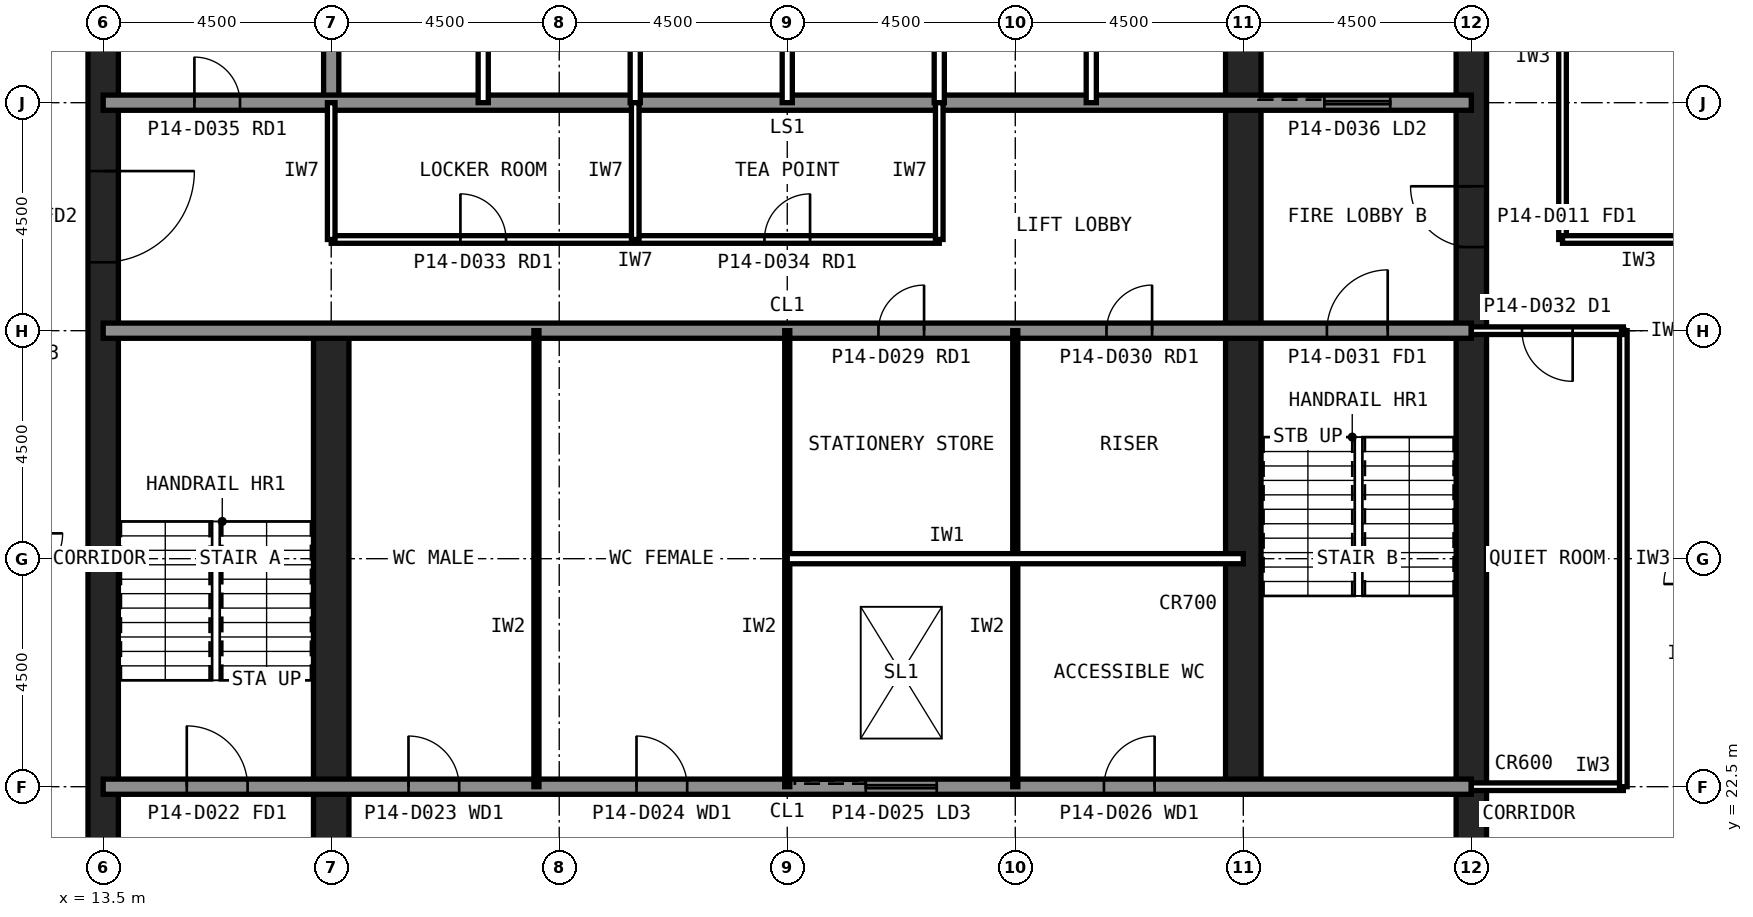
"""IFC4 building model, lengths in metres.
Left out: names, types, materials, properties, quantities, classifications, styles, units other than length and angle.
Written with IfcOpenShell. Run it as: python <this file> out.ifc"""

import sys

from ifc_helpers import new_model, si_unit, direction, frame, frame_2d, origin, place, context, subcontext, project, spatial, rectangle, extrude, element, fill, save


model = new_model("IFC4")
c1 = context("Model", 3, precision=1e-05, world=origin(), true_north=direction((0.0, 1.0)))
c2 = subcontext(c1, "Body", "Model", "MODEL_VIEW")
j1 = project(units=[si_unit("LENGTHUNIT", "METRE"), si_unit("PLANEANGLEUNIT", "RADIAN")], contexts=[c1])
p1 = place(None, origin())
s1 = spatial("IfcSite", under=j1, at=p1, CompositionType="ELEMENT")
p2 = place(p1, origin())
s2 = spatial("IfcBuilding", under=s1, at=p2, CompositionType="ELEMENT")
p3 = place(p2, frame((0.0, 0.0, 62.6)))
s3 = spatial("IfcBuildingStorey", under=s2, at=p3, CompositionType="ELEMENT", Elevation=62.6)
p4 = place(p3, frame((40.5, 13.5, 0.0), z_axis=(0.0, 0.0, 1.0), x_axis=(0.0, 1.0, 0.0)))
e1 = element("IfcWall", 1, at=p4, inside=s3, PredefinedType="SHEAR", context=c2, shape_type="SweptSolid", body=[
    extrude(rectangle(XDim=27.0, YDim=0.6, at=frame_2d((13.5, 0.0))), origin(), (0.0, 0.0, 1.0), 4.2),
])
p5 = place(p4, frame((5.85, 0.0, 0.0)))
e2 = element("IfcOpeningElement", 2, at=p5, cuts=e1, PredefinedType="OPENING", context=c2, shape_type="SweptSolid", body=[
    extrude(rectangle(XDim=1.8, YDim=2.1, at=frame_2d((0.9, 1.05))), frame((0.0, 0.31, 0.0), z_axis=(0.0, -1.0, 0.0), x_axis=(1.0, 0.0, 0.0)), (0.0, 0.0, 1.0), 0.62),
])
p6 = place(p4, frame((19.65, 0.0, 0.0)))
e3 = element("IfcOpeningElement", 3, at=p6, cuts=e1, PredefinedType="OPENING", context=c2, shape_type="SweptSolid", body=[
    extrude(rectangle(XDim=1.2, YDim=2.1, at=frame_2d((0.6, 1.05))), frame((0.0, 0.31, 0.0), z_axis=(0.0, -1.0, 0.0), x_axis=(1.0, 0.0, 0.0)), (0.0, 0.0, 1.0), 0.62),
])
p7 = place(p3, frame((13.5, 40.5, 0.0), z_axis=(0.0, 0.0, 1.0), x_axis=(0.0, -1.0, 0.0)))
e4 = element("IfcWall", 4, at=p7, inside=s3, PredefinedType="SHEAR", context=c2, shape_type="SweptSolid", body=[
    extrude(rectangle(XDim=27.0, YDim=0.6, at=frame_2d((13.5, 0.0))), origin(), (0.0, 0.0, 1.0), 4.2),
])
p8 = place(p7, frame((19.65, 0.0, 0.0)))
e5 = element("IfcOpeningElement", 5, at=p8, cuts=e4, PredefinedType="OPENING", context=c2, shape_type="SweptSolid", body=[
    extrude(rectangle(XDim=1.2, YDim=2.1, at=frame_2d((0.6, 1.05))), frame((0.0, 0.31, 0.0), z_axis=(0.0, -1.0, 0.0), x_axis=(1.0, 0.0, 0.0)), (0.0, 0.0, 1.0), 0.62),
])
p9 = place(p7, frame((5.85, 0.0, 0.0)))
e6 = element("IfcOpeningElement", 6, at=p9, cuts=e4, PredefinedType="OPENING", context=c2, shape_type="SweptSolid", body=[
    extrude(rectangle(XDim=1.8, YDim=2.1, at=frame_2d((0.9, 1.05))), frame((0.0, 0.31, 0.0), z_axis=(0.0, -1.0, 0.0), x_axis=(1.0, 0.0, 0.0)), (0.0, 0.0, 1.0), 0.62),
])
p10 = place(p3, frame((18.0, 13.5, 0.0), z_axis=(0.0, 0.0, 1.0), x_axis=(0.0, 1.0, 0.0)))
e7 = element("IfcWall", 7, at=p10, inside=s3, PredefinedType="SHEAR", context=c2, shape_type="SweptSolid", body=[
    extrude(rectangle(XDim=18.0, YDim=0.7, at=frame_2d((9.0, 0.0))), origin(), (0.0, 0.0, 1.0), 4.2),
])
p11 = place(p3, frame((18.0, 36.0, 0.0), z_axis=(0.0, 0.0, 1.0), x_axis=(0.0, 1.0, 0.0)))
e8 = element("IfcWall", 8, at=p11, inside=s3, PredefinedType="SOLIDWALL", context=c2, shape_type="SweptSolid", body=[
    extrude(rectangle(XDim=4.5, YDim=0.3, at=frame_2d((2.25, 0.0))), origin(), (0.0, 0.0, 1.0), 4.04),
])
p12 = place(p3, frame((36.0, 22.5, 0.0), z_axis=(0.0, 0.0, 1.0), x_axis=(0.0, 1.0, 0.0)))
e9 = element("IfcWall", 9, at=p12, inside=s3, PredefinedType="SHEAR", context=c2, shape_type="SweptSolid", body=[
    extrude(rectangle(XDim=18.0, YDim=0.7, at=frame_2d((9.0, 0.0))), origin(), (0.0, 0.0, 1.0), 4.2),
])
p13 = place(p3, frame((13.5, 36.0, 0.0), z_axis=(0.0, 0.0, 1.0), x_axis=(1.0, 0.0, 0.0)))
e10 = element("IfcWall", 10, at=p13, inside=s3, PredefinedType="SOLIDWALL", context=c2, shape_type="SweptSolid", body=[
    extrude(rectangle(XDim=27.0, YDim=0.3, at=frame_2d((13.5, 0.0))), origin(), (0.0, 0.0, 1.0), 4.04),
])
p14 = place(p13, frame((1.8, 0.0, 0.0)))
e11 = element("IfcOpeningElement", 11, at=p14, cuts=e10, PredefinedType="OPENING", context=c2, shape_type="SweptSolid", body=[
    extrude(rectangle(XDim=0.9, YDim=2.1, at=frame_2d((0.45, 1.05))), frame((0.0, 0.16, 0.0), z_axis=(0.0, -1.0, 0.0), x_axis=(1.0, 0.0, 0.0)), (0.0, 0.0, 1.0), 0.32),
])
p15 = place(p13, frame((24.1, 0.0, 0.0)))
e12 = element("IfcOpeningElement", 12, at=p15, cuts=e10, PredefinedType="OPENING", context=c2, shape_type="SweptSolid", body=[
    extrude(rectangle(XDim=1.3, YDim=2.2, at=frame_2d((0.65, 1.1))), frame((0.0, 0.16, 0.0), z_axis=(0.0, -1.0, 0.0), x_axis=(1.0, 0.0, 0.0)), (0.0, 0.0, 1.0), 0.32),
])
p16 = place(p3, frame((13.5, 22.5, 0.0), z_axis=(0.0, 0.0, 1.0), x_axis=(1.0, 0.0, 0.0)))
e13 = element("IfcWall", 13, at=p16, inside=s3, PredefinedType="SOLIDWALL", context=c2, shape_type="SweptSolid", body=[
    extrude(rectangle(XDim=27.0, YDim=0.3, at=frame_2d((13.5, 0.0))), origin(), (0.0, 0.0, 1.0), 4.04),
])
p17 = place(p16, frame((1.65, 0.0, 0.0)))
e14 = element("IfcOpeningElement", 14, at=p17, cuts=e13, PredefinedType="OPENING", context=c2, shape_type="SweptSolid", body=[
    extrude(rectangle(XDim=1.2, YDim=2.1, at=frame_2d((0.6, 1.05))), frame((0.0, 0.16, 0.0), z_axis=(0.0, -1.0, 0.0), x_axis=(1.0, 0.0, 0.0)), (0.0, 0.0, 1.0), 0.32),
])
p18 = place(p16, frame((6.025, 0.0, 0.0)))
e15 = element("IfcOpeningElement", 15, at=p18, cuts=e13, PredefinedType="OPENING", context=c2, shape_type="SweptSolid", body=[
    extrude(rectangle(XDim=1.0, YDim=2.1, at=frame_2d((0.5, 1.05))), frame((0.0, 0.16, 0.0), z_axis=(0.0, -1.0, 0.0), x_axis=(1.0, 0.0, 0.0)), (0.0, 0.0, 1.0), 0.32),
])
p19 = place(p16, frame((10.525, 0.0, 0.0)))
e16 = element("IfcOpeningElement", 16, at=p19, cuts=e13, PredefinedType="OPENING", context=c2, shape_type="SweptSolid", body=[
    extrude(rectangle(XDim=1.0, YDim=2.1, at=frame_2d((0.5, 1.05))), frame((0.0, 0.16, 0.0), z_axis=(0.0, -1.0, 0.0), x_axis=(1.0, 0.0, 0.0)), (0.0, 0.0, 1.0), 0.32),
])
p20 = place(p16, frame((19.75, 0.0, 0.0)))
e17 = element("IfcOpeningElement", 17, at=p20, cuts=e13, PredefinedType="OPENING", context=c2, shape_type="SweptSolid", body=[
    extrude(rectangle(XDim=1.0, YDim=2.1, at=frame_2d((0.5, 1.05))), frame((0.0, 0.16, 0.0), z_axis=(0.0, -1.0, 0.0), x_axis=(1.0, 0.0, 0.0)), (0.0, 0.0, 1.0), 0.32),
])
p21 = place(p16, frame((15.05, 0.0, 0.0)))
e18 = element("IfcOpeningElement", 18, at=p21, cuts=e13, PredefinedType="OPENING", context=c2, shape_type="SweptSolid", body=[
    extrude(rectangle(XDim=1.4, YDim=2.4, at=frame_2d((0.7, 1.2))), frame((0.0, 0.16, 0.0), z_axis=(0.0, -1.0, 0.0), x_axis=(1.0, 0.0, 0.0)), (0.0, 0.0, 1.0), 0.32),
])
p22 = place(p3, frame((13.5, 31.5, 0.0), z_axis=(0.0, 0.0, 1.0), x_axis=(1.0, 0.0, 0.0)))
e19 = element("IfcWall", 19, at=p22, inside=s3, PredefinedType="SOLIDWALL", context=c2, shape_type="SweptSolid", body=[
    extrude(rectangle(XDim=27.0, YDim=0.3, at=frame_2d((13.5, 0.0))), origin(), (0.0, 0.0, 1.0), 4.04),
])
p23 = place(p22, frame((24.15, 0.0, 0.0)))
e20 = element("IfcOpeningElement", 20, at=p23, cuts=e19, PredefinedType="OPENING", context=c2, shape_type="SweptSolid", body=[
    extrude(rectangle(XDim=1.2, YDim=2.1, at=frame_2d((0.6, 1.05))), frame((0.0, 0.16, 0.0), z_axis=(0.0, -1.0, 0.0), x_axis=(1.0, 0.0, 0.0)), (0.0, 0.0, 1.0), 0.32),
])
p24 = place(p22, frame((15.3, 0.0, 0.0)))
e21 = element("IfcOpeningElement", 21, at=p24, cuts=e19, PredefinedType="OPENING", context=c2, shape_type="SweptSolid", body=[
    extrude(rectangle(XDim=0.9, YDim=2.1, at=frame_2d((0.45, 1.05))), frame((0.0, 0.16, 0.0), z_axis=(0.0, -1.0, 0.0), x_axis=(1.0, 0.0, 0.0)), (0.0, 0.0, 1.0), 0.32),
])
p25 = place(p22, frame((19.8, 0.0, 0.0)))
e22 = element("IfcOpeningElement", 22, at=p25, cuts=e19, PredefinedType="OPENING", context=c2, shape_type="SweptSolid", body=[
    extrude(rectangle(XDim=0.9, YDim=2.1, at=frame_2d((0.45, 1.05))), frame((0.0, 0.16, 0.0), z_axis=(0.0, -1.0, 0.0), x_axis=(1.0, 0.0, 0.0)), (0.0, 0.0, 1.0), 0.32),
])
for number, where, z_axis, x_axis in (
    (23, (21.0, 36.0, 0.0), (0.0, 0.0, 1.0), (0.0, 1.0, 0.0)),
    (24, (24.0, 36.0, 0.0), (0.0, 0.0, 1.0), (0.0, 1.0, 0.0)),
    (25, (27.0, 36.0, 0.0), (0.0, 0.0, 1.0), (0.0, 1.0, 0.0)),
    (26, (30.0, 36.0, 0.0), (0.0, 0.0, 1.0), (0.0, 1.0, 0.0)),
    (27, (33.0, 36.0, 0.0), (0.0, 0.0, 1.0), (0.0, 1.0, 0.0)),
):
    element("IfcWall", number, at=place(p3, frame(where, z_axis=z_axis, x_axis=x_axis)), inside=s3, PredefinedType="PARTITIONING", context=c2, shape_type="SweptSolid", body=[
        extrude(rectangle(XDim=4.5, YDim=0.2, at=frame_2d((2.25, 0.0))), origin(), (0.0, 0.0, 1.0), 4.04),
    ])
for number, where, z_axis, x_axis in (
    (28, (22.05, 22.5, 0.0), (0.0, 0.0, 1.0), (0.0, 1.0, 0.0)),
    (29, (27.0, 22.5, 0.0), (0.0, 0.0, 1.0), (0.0, 1.0, 0.0)),
    (30, (31.5, 22.5, 0.0), (0.0, 0.0, 1.0), (0.0, 1.0, 0.0)),
):
    element("IfcWall", number, at=place(p3, frame(where, z_axis=z_axis, x_axis=x_axis)), inside=s3, PredefinedType="PLUMBINGWALL", context=c2, shape_type="SweptSolid", body=[
        extrude(rectangle(XDim=9.0, YDim=0.1, at=frame_2d((4.5, 0.0))), origin(), (0.0, 0.0, 1.0), 4.04),
    ])
p26 = place(p3, frame((27.0, 27.0, 0.0), z_axis=(0.0, 0.0, 1.0), x_axis=(1.0, 0.0, 0.0)))
e31 = element("IfcWall", 31, at=p26, inside=s3, PredefinedType="PARTITIONING", context=c2, shape_type="SweptSolid", body=[
    extrude(rectangle(XDim=9.0, YDim=0.2, at=frame_2d((4.5, 0.0))), origin(), (0.0, 0.0, 1.0), 4.04),
])
p27 = place(p3, frame((18.0, 33.3, 0.0), z_axis=(0.0, 0.0, 1.0), x_axis=(1.0, 0.0, 0.0)))
e32 = element("IfcWall", 32, at=p27, inside=s3, PredefinedType="PARTITIONING", context=c2, shape_type="SweptSolid", body=[
    extrude(rectangle(XDim=12.0, YDim=0.15, at=frame_2d((6.0, 0.0))), origin(), (0.0, 0.0, 1.0), 4.04),
])
p28 = place(p27, frame((2.55, 0.0, 0.0)))
e33 = element("IfcOpeningElement", 33, at=p28, cuts=e32, PredefinedType="OPENING", context=c2, shape_type="SweptSolid", body=[
    extrude(rectangle(XDim=0.9, YDim=2.1, at=frame_2d((0.45, 1.05))), frame((0.0, 0.085, 0.0), z_axis=(0.0, -1.0, 0.0), x_axis=(1.0, 0.0, 0.0)), (0.0, 0.0, 1.0), 0.17),
])
p29 = place(p27, frame((8.55, 0.0, 0.0)))
e34 = element("IfcOpeningElement", 34, at=p29, cuts=e32, PredefinedType="OPENING", context=c2, shape_type="SweptSolid", body=[
    extrude(rectangle(XDim=0.9, YDim=2.1, at=frame_2d((0.45, 1.05))), frame((0.0, 0.085, 0.0), z_axis=(0.0, -1.0, 0.0), x_axis=(1.0, 0.0, 0.0)), (0.0, 0.0, 1.0), 0.17),
])
for number, where, z_axis, x_axis in (
    (35, (18.0, 33.3, 0.0), (0.0, 0.0, 1.0), (0.0, 1.0, 0.0)),
    (36, (24.0, 33.3, 0.0), (0.0, 0.0, 1.0), (0.0, 1.0, 0.0)),
    (37, (30.0, 33.3, 0.0), (0.0, 0.0, 1.0), (0.0, 1.0, 0.0)),
):
    element("IfcWall", number, at=place(p3, frame(where, z_axis=z_axis, x_axis=x_axis)), inside=s3, PredefinedType="PARTITIONING", context=c2, shape_type="SweptSolid", body=[
        extrude(rectangle(XDim=2.7, YDim=0.15, at=frame_2d((1.35, 0.0))), origin(), (0.0, 0.0, 1.0), 4.04),
    ])
p30 = place(p3, frame((42.3, 33.3, 0.0), z_axis=(0.0, 0.0, 1.0), x_axis=(0.0, 1.0, 0.0)))
e38 = element("IfcWall", 38, at=p30, inside=s3, PredefinedType="PARTITIONING", context=c2, shape_type="SweptSolid", body=[
    extrude(rectangle(XDim=7.2, YDim=0.15, at=frame_2d((3.6, 0.0))), origin(), (0.0, 0.0, 1.0), 4.04),
])
p31 = place(p3, frame((45.3, 33.3, 0.0), z_axis=(0.0, 0.0, 1.0), x_axis=(-1.0, 0.0, 0.0)))
e39 = element("IfcWall", 39, at=p31, inside=s3, PredefinedType="PARTITIONING", context=c2, shape_type="SweptSolid", body=[
    extrude(rectangle(XDim=3.0, YDim=0.15, at=frame_2d((1.5, 0.0))), origin(), (0.0, 0.0, 1.0), 4.04),
])
p32 = place(p3, frame((40.5, 22.5, 0.0), z_axis=(0.0, 0.0, 1.0), x_axis=(1.0, 0.0, 0.0)))
e40 = element("IfcWall", 40, at=p32, inside=s3, PredefinedType="PARTITIONING", context=c2, shape_type="SweptSolid", body=[
    extrude(rectangle(XDim=3.0, YDim=0.15, at=frame_2d((1.5, 0.0))), origin(), (0.0, 0.0, 1.0), 3.189),
])
p33 = place(p3, frame((43.5, 22.5, 0.0), z_axis=(0.0, 0.0, 1.0), x_axis=(0.0, 1.0, 0.0)))
e41 = element("IfcWall", 41, at=p33, inside=s3, PredefinedType="PARTITIONING", context=c2, shape_type="SweptSolid", body=[
    extrude(rectangle(XDim=9.0, YDim=0.15, at=frame_2d((4.5, 0.0))), origin(), (0.0, 0.0, 1.0), 4.04),
])
p34 = place(p3, frame((43.5, 31.5, 0.0), z_axis=(0.0, 0.0, 1.0), x_axis=(-1.0, 0.0, 0.0)))
e42 = element("IfcWall", 42, at=p34, inside=s3, PredefinedType="PARTITIONING", context=c2, shape_type="SweptSolid", body=[
    extrude(rectangle(XDim=3.0, YDim=0.15, at=frame_2d((1.5, 0.0))), origin(), (0.0, 0.0, 1.0), 3.189),
])
p35 = place(p34, frame((1.0, 0.0, 0.0)))
e43 = element("IfcOpeningElement", 43, at=p35, cuts=e42, PredefinedType="OPENING", context=c2, shape_type="SweptSolid", body=[
    extrude(rectangle(XDim=1.0, YDim=2.1, at=frame_2d((0.5, 1.05))), frame((0.0, 0.085, 0.0), z_axis=(0.0, -1.0, 0.0), x_axis=(1.0, 0.0, 0.0)), (0.0, 0.0, 1.0), 0.17),
])
p36 = place(p9, origin())
e44 = element("IfcDoor", 44, at=p36, inside=s3, OperationType="SINGLE_SWING_LEFT", PredefinedType="DOOR", context=c2, shape_type="SweptSolid", body=[
    extrude(rectangle(XDim=1.8, YDim=2.1, at=frame_2d((0.9, 1.05))), frame((0.0, 0.025, 0.0), z_axis=(0.0, -1.0, 0.0), x_axis=(1.0, 0.0, 0.0)), (0.0, 0.0, 1.0), 0.05),
])
fill(e6, e44)
p37 = place(p6, origin())
e45 = element("IfcDoor", 45, at=p37, inside=s3, OperationType="SINGLE_SWING_RIGHT", PredefinedType="DOOR", context=c2, shape_type="SweptSolid", body=[
    extrude(rectangle(XDim=1.2, YDim=2.1, at=frame_2d((0.6, 1.05))), frame((0.0, 0.025, 0.0), z_axis=(0.0, -1.0, 0.0), x_axis=(1.0, 0.0, 0.0)), (0.0, 0.0, 1.0), 0.05),
])
fill(e3, e45)
p38 = place(p17, origin())
e46 = element("IfcDoor", 46, at=p38, inside=s3, OperationType="SINGLE_SWING_LEFT", PredefinedType="DOOR", context=c2, shape_type="SweptSolid", body=[
    extrude(rectangle(XDim=1.2, YDim=2.1, at=frame_2d((0.6, 1.05))), frame((0.0, 0.025, 0.0), z_axis=(0.0, -1.0, 0.0), x_axis=(1.0, 0.0, 0.0)), (0.0, 0.0, 1.0), 0.05),
])
fill(e14, e46)
p39 = place(p23, origin())
e47 = element("IfcDoor", 47, at=p39, inside=s3, OperationType="SINGLE_SWING_RIGHT", PredefinedType="DOOR", context=c2, shape_type="SweptSolid", body=[
    extrude(rectangle(XDim=1.2, YDim=2.1, at=frame_2d((0.6, 1.05))), frame((0.0, 0.025, 0.0), z_axis=(0.0, -1.0, 0.0), x_axis=(1.0, 0.0, 0.0)), (0.0, 0.0, 1.0), 0.05),
])
fill(e20, e47)
p40 = place(p18, origin())
e48 = element("IfcDoor", 48, at=p40, inside=s3, OperationType="SINGLE_SWING_LEFT", PredefinedType="DOOR", context=c2, shape_type="SweptSolid", body=[
    extrude(rectangle(XDim=1.0, YDim=2.1, at=frame_2d((0.5, 1.05))), frame((0.0, 0.025, 0.0), z_axis=(0.0, -1.0, 0.0), x_axis=(1.0, 0.0, 0.0)), (0.0, 0.0, 1.0), 0.05),
])
fill(e15, e48)
p41 = place(p19, origin())
e49 = element("IfcDoor", 49, at=p41, inside=s3, OperationType="SINGLE_SWING_LEFT", PredefinedType="DOOR", context=c2, shape_type="SweptSolid", body=[
    extrude(rectangle(XDim=1.0, YDim=2.1, at=frame_2d((0.5, 1.05))), frame((0.0, 0.025, 0.0), z_axis=(0.0, -1.0, 0.0), x_axis=(1.0, 0.0, 0.0)), (0.0, 0.0, 1.0), 0.05),
])
fill(e16, e49)
p42 = place(p20, origin())
e50 = element("IfcDoor", 50, at=p42, inside=s3, OperationType="SINGLE_SWING_RIGHT", PredefinedType="DOOR", context=c2, shape_type="SweptSolid", body=[
    extrude(rectangle(XDim=1.0, YDim=2.1, at=frame_2d((0.5, 1.05))), frame((0.0, 0.025, 0.0), z_axis=(0.0, -1.0, 0.0), x_axis=(1.0, 0.0, 0.0)), (0.0, 0.0, 1.0), 0.05),
])
fill(e17, e50)
p43 = place(p24, origin())
e51 = element("IfcDoor", 51, at=p43, inside=s3, OperationType="SINGLE_SWING_RIGHT", PredefinedType="DOOR", context=c2, shape_type="SweptSolid", body=[
    extrude(rectangle(XDim=0.9, YDim=2.1, at=frame_2d((0.45, 1.05))), frame((0.0, 0.025, 0.0), z_axis=(0.0, -1.0, 0.0), x_axis=(1.0, 0.0, 0.0)), (0.0, 0.0, 1.0), 0.05),
])
fill(e21, e51)
p44 = place(p25, origin())
e52 = element("IfcDoor", 52, at=p44, inside=s3, OperationType="SINGLE_SWING_RIGHT", PredefinedType="DOOR", context=c2, shape_type="SweptSolid", body=[
    extrude(rectangle(XDim=0.9, YDim=2.1, at=frame_2d((0.45, 1.05))), frame((0.0, 0.025, 0.0), z_axis=(0.0, -1.0, 0.0), x_axis=(1.0, 0.0, 0.0)), (0.0, 0.0, 1.0), 0.05),
])
fill(e22, e52)
p45 = place(p14, origin())
e53 = element("IfcDoor", 53, at=p45, inside=s3, OperationType="SINGLE_SWING_LEFT", PredefinedType="DOOR", context=c2, shape_type="SweptSolid", body=[
    extrude(rectangle(XDim=0.9, YDim=2.1, at=frame_2d((0.45, 1.05))), frame((0.0, 0.025, 0.0), z_axis=(0.0, -1.0, 0.0), x_axis=(1.0, 0.0, 0.0)), (0.0, 0.0, 1.0), 0.05),
])
fill(e11, e53)
p46 = place(p28, origin())
e54 = element("IfcDoor", 54, at=p46, inside=s3, OperationType="SINGLE_SWING_LEFT", PredefinedType="DOOR", context=c2, shape_type="SweptSolid", body=[
    extrude(rectangle(XDim=0.9, YDim=2.1, at=frame_2d((0.45, 1.05))), frame((0.0, 0.025, 0.0), z_axis=(0.0, -1.0, 0.0), x_axis=(1.0, 0.0, 0.0)), (0.0, 0.0, 1.0), 0.05),
])
fill(e33, e54)
p47 = place(p29, origin())
e55 = element("IfcDoor", 55, at=p47, inside=s3, OperationType="SINGLE_SWING_RIGHT", PredefinedType="DOOR", context=c2, shape_type="SweptSolid", body=[
    extrude(rectangle(XDim=0.9, YDim=2.1, at=frame_2d((0.45, 1.05))), frame((0.0, 0.025, 0.0), z_axis=(0.0, -1.0, 0.0), x_axis=(1.0, 0.0, 0.0)), (0.0, 0.0, 1.0), 0.05),
])
fill(e34, e55)
p48 = place(p15, origin())
e56 = element("IfcDoor", 56, at=p48, inside=s3, OperationType="SLIDING_TO_LEFT", PredefinedType="DOOR", context=c2, shape_type="SweptSolid", body=[
    extrude(rectangle(XDim=1.3, YDim=2.2, at=frame_2d((0.65, 1.1))), frame((0.0, 0.025, 0.0), z_axis=(0.0, -1.0, 0.0), x_axis=(1.0, 0.0, 0.0)), (0.0, 0.0, 1.0), 0.05),
])
fill(e12, e56)
p49 = place(p21, origin())
e57 = element("IfcDoor", 57, at=p49, inside=s3, OperationType="SLIDING_TO_LEFT", PredefinedType="DOOR", context=c2, shape_type="SweptSolid", body=[
    extrude(rectangle(XDim=1.4, YDim=2.4, at=frame_2d((0.7, 1.2))), frame((0.0, 0.025, 0.0), z_axis=(0.0, -1.0, 0.0), x_axis=(1.0, 0.0, 0.0)), (0.0, 0.0, 1.0), 0.05),
])
fill(e18, e57)
p50 = place(p35, origin())
e58 = element("IfcDoor", 58, at=p50, inside=s3, OperationType="SINGLE_SWING_LEFT", PredefinedType="DOOR", context=c2, shape_type="SweptSolid", body=[
    extrude(rectangle(XDim=1.0, YDim=2.1, at=frame_2d((0.5, 1.05))), frame((0.0, 0.025, 0.0), z_axis=(0.0, -1.0, 0.0), x_axis=(1.0, 0.0, 0.0)), (0.0, 0.0, 1.0), 0.05),
])
fill(e43, e58)
save(model, sys.argv[1])
